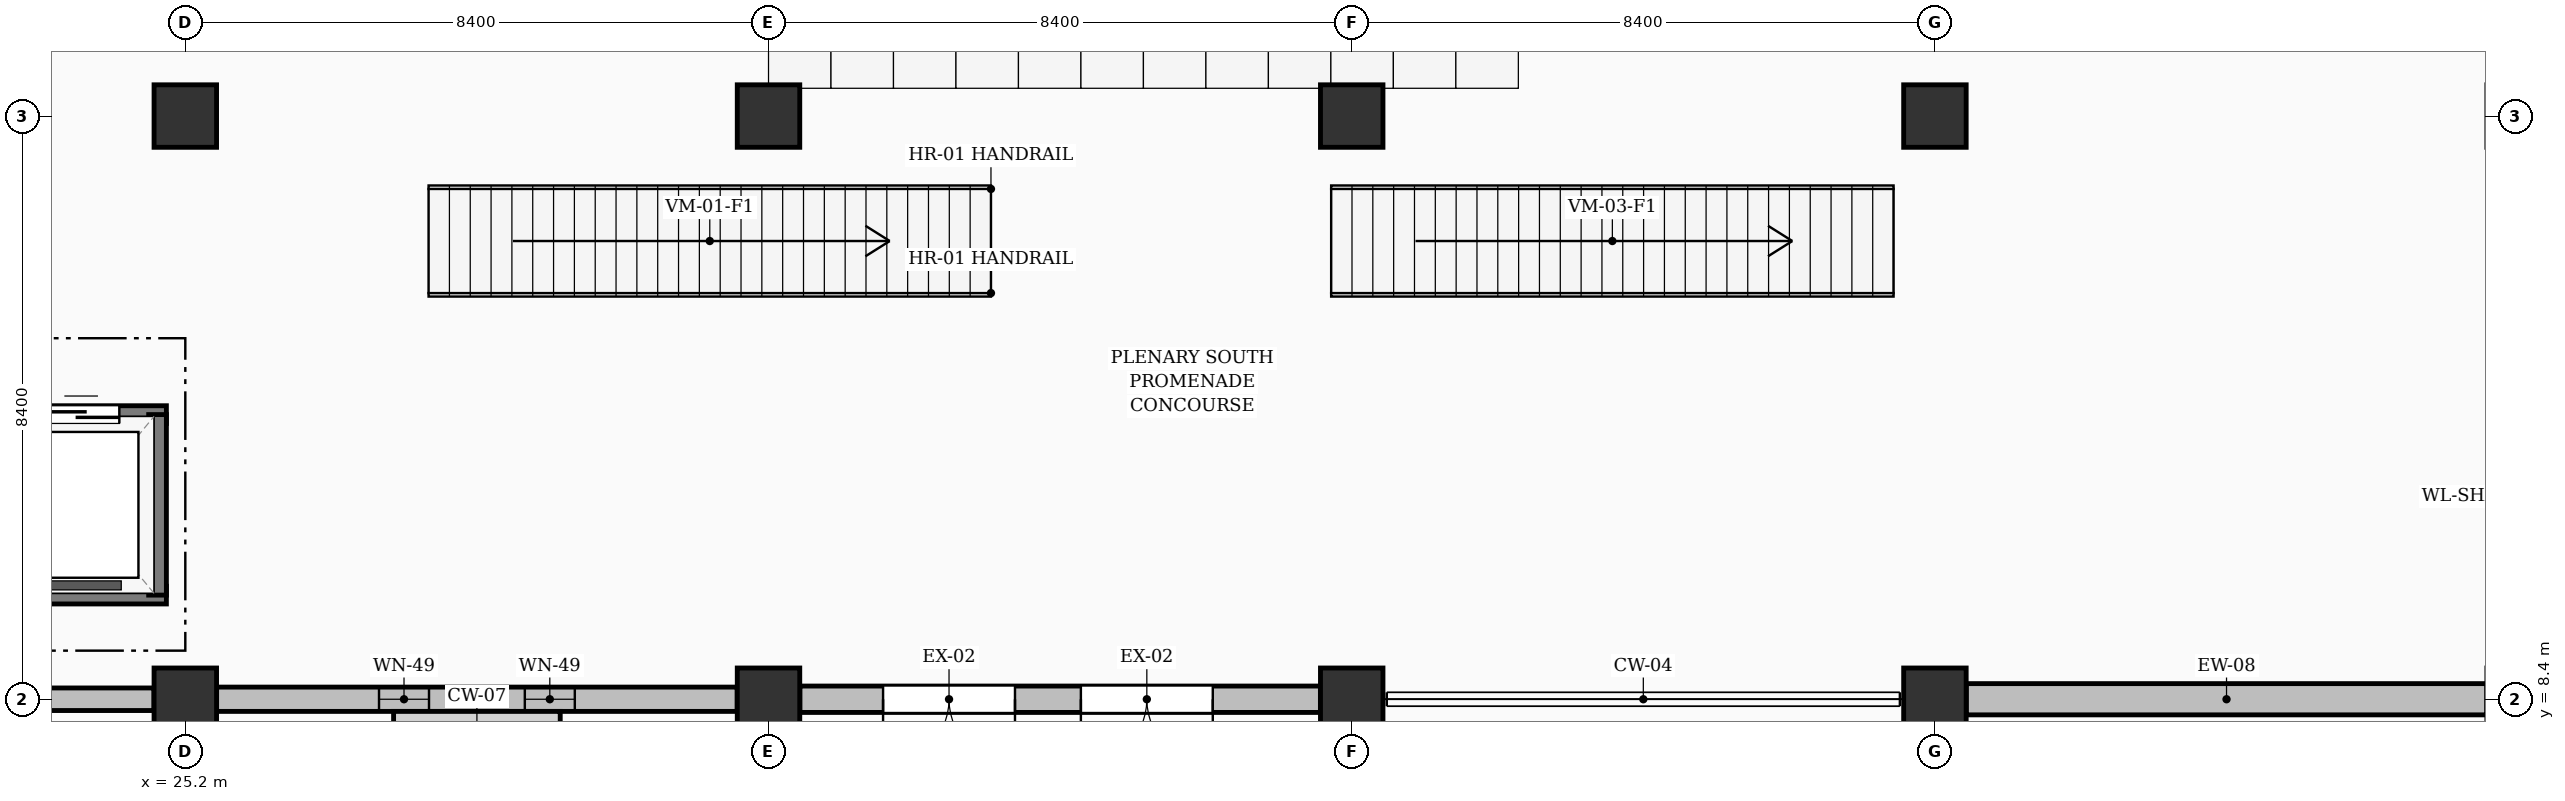
"""IFC4 building model, lengths in metres.
Left out: names, types, materials, properties, quantities, classifications, styles, units other than length and angle.
Written with IfcOpenShell. Run it as: python <this file> out.ifc"""

import sys

from ifc_helpers import new_model, si_unit, direction, frame, frame_2d, origin, origin_2d, place, context, subcontext, project, spatial, rectangle, extrude, element, fill, save


model = new_model("IFC4")
c1 = context("Model", 3, precision=1e-05, world=origin(), true_north=direction((0.0, 1.0)))
c2 = subcontext(c1, "Body", "Model", "MODEL_VIEW")
j1 = project(units=[si_unit("LENGTHUNIT", "METRE"), si_unit("PLANEANGLEUNIT", "RADIAN")], contexts=[c1])
p1 = place(None, origin())
s1 = spatial("IfcSite", under=j1, at=p1, CompositionType="ELEMENT")
p2 = place(p1, origin())
s2 = spatial("IfcBuilding", under=s1, at=p2, CompositionType="ELEMENT")
p3 = place(p2, origin())
s3 = spatial("IfcBuildingStorey", under=s2, at=p3, CompositionType="ELEMENT", Elevation=0.0)
for number, where, z_axis, x_axis in (
    (1, (25.2, 8.4, 0.0), (0.0, 0.0, 1.0), (1.0, 0.0, 0.0)),
    (2, (25.2, 16.8, 0.0), (0.0, 0.0, 1.0), (1.0, 0.0, 0.0)),
    (3, (33.6, 8.4, 0.0), (0.0, 0.0, 1.0), (1.0, 0.0, 0.0)),
    (4, (33.6, 16.8, 0.0), (0.0, 0.0, 1.0), (1.0, 0.0, 0.0)),
    (5, (42.0, 8.4, 0.0), (0.0, 0.0, 1.0), (1.0, 0.0, 0.0)),
    (6, (42.0, 16.8, 0.0), (0.0, 0.0, 1.0), (1.0, 0.0, 0.0)),
    (7, (50.4, 8.4, 0.0), (0.0, 0.0, 1.0), (1.0, 0.0, 0.0)),
    (8, (50.4, 16.8, 0.0), (0.0, 0.0, 1.0), (1.0, 0.0, 0.0)),
):
    element("IfcColumn", number, at=place(p3, frame(where, z_axis=z_axis, x_axis=x_axis)), inside=s3, PredefinedType="COLUMN", context=c2, shape_type="SweptSolid", body=[
        extrude(rectangle(XDim=0.9, YDim=0.9, at=origin_2d()), origin(), (0.0, 0.0, 1.0), 3.92),
    ])
p4 = place(p3, frame((17.251, 8.4, 0.0), z_axis=(0.0, 0.0, 1.0), x_axis=(1.0, 0.0, 0.0)))
e9 = element("IfcWall", 9, at=p4, inside=s3, PredefinedType="SOLIDWALL", context=c2, shape_type="SweptSolid", body=[
    extrude(rectangle(XDim=7.498, YDim=0.325, at=frame_2d((3.749, 0.0))), origin(), (0.0, 0.0, 1.0), 2.825),
])
p5 = place(p3, frame((25.651, 8.4, 0.0), z_axis=(0.0, 0.0, 1.0), x_axis=(1.0, 0.0, 0.0)))
e10 = element("IfcWall", 10, at=p5, inside=s3, PredefinedType="SOLIDWALL", context=c2, shape_type="SweptSolid", body=[
    extrude(rectangle(XDim=7.498, YDim=0.35, at=frame_2d((3.749, 0.0))), origin(), (0.0, 0.0, 1.0), 2.825),
])
p6 = place(p5, frame((2.339, 0.0, 0.3)))
e11 = element("IfcOpeningElement", 11, at=p6, cuts=e10, PredefinedType="OPENING", context=c2, shape_type="SweptSolid", body=[
    extrude(rectangle(XDim=0.72, YDim=1.95, at=frame_2d((0.36, 0.975))), frame((0.0, 0.185, 0.0), z_axis=(0.0, -1.0, 0.0), x_axis=(1.0, 0.0, 0.0)), (0.0, 0.0, 1.0), 0.37),
])
p7 = place(p5, frame((4.439, 0.0, 0.3)))
e12 = element("IfcOpeningElement", 12, at=p7, cuts=e10, PredefinedType="OPENING", context=c2, shape_type="SweptSolid", body=[
    extrude(rectangle(XDim=0.72, YDim=1.95, at=frame_2d((0.36, 0.975))), frame((0.0, 0.185, 0.0), z_axis=(0.0, -1.0, 0.0), x_axis=(1.0, 0.0, 0.0)), (0.0, 0.0, 1.0), 0.37),
])
p8 = place(p3, frame((34.051, 8.4, 0.0), z_axis=(0.0, 0.0, 1.0), x_axis=(1.0, 0.0, 0.0)))
e13 = element("IfcWall", 13, at=p8, inside=s3, PredefinedType="SOLIDWALL", context=c2, shape_type="SweptSolid", body=[
    extrude(rectangle(XDim=7.498, YDim=0.38, at=frame_2d((3.749, 0.0))), origin(), (0.0, 0.0, 1.0), 2.825),
])
p9 = place(p8, frame((1.199, 0.0, 0.0)))
e14 = element("IfcOpeningElement", 14, at=p9, cuts=e13, PredefinedType="OPENING", context=c2, shape_type="SweptSolid", body=[
    extrude(rectangle(XDim=1.9, YDim=2.2, at=frame_2d((0.95, 1.1))), frame((0.0, 0.2, 0.0), z_axis=(0.0, -1.0, 0.0), x_axis=(1.0, 0.0, 0.0)), (0.0, 0.0, 1.0), 0.4),
])
p10 = place(p8, frame((4.048, 0.0, 0.0)))
e15 = element("IfcOpeningElement", 15, at=p10, cuts=e13, PredefinedType="OPENING", context=c2, shape_type="SweptSolid", body=[
    extrude(rectangle(XDim=1.9, YDim=2.2, at=frame_2d((0.95, 1.1))), frame((0.0, 0.2, 0.0), z_axis=(0.0, -1.0, 0.0), x_axis=(1.0, 0.0, 0.0)), (0.0, 0.0, 1.0), 0.4),
])
p11 = place(p3, frame((50.851, 8.4, 0.0), z_axis=(0.0, 0.0, 1.0), x_axis=(1.0, 0.0, 0.0)))
e16 = element("IfcWall", 16, at=p11, inside=s3, PredefinedType="SOLIDWALL", context=c2, shape_type="SweptSolid", body=[
    extrude(rectangle(XDim=7.498, YDim=0.45, at=frame_2d((3.749, 0.0))), origin(), (0.0, 0.0, 1.0), 2.825),
])
p12 = place(p3, frame((22.472, 9.9, 0.0), z_axis=(0.0, 0.0, 1.0), x_axis=(1.0, 0.0, 0.0)))
e17 = element("IfcWall", 17, at=p12, inside=s3, PredefinedType="SOLIDWALL", context=c2, shape_type="SweptSolid", body=[
    extrude(rectangle(XDim=2.455, YDim=0.255, at=frame_2d((1.228, 0.0))), origin(), (0.0, 0.0, 1.0), 3.64),
])
p13 = place(p3, frame((22.472, 12.5, 0.0), z_axis=(0.0, 0.0, 1.0), x_axis=(1.0, 0.0, 0.0)))
e18 = element("IfcWall", 18, at=p13, inside=s3, PredefinedType="SOLIDWALL", context=c2, shape_type="SweptSolid", body=[
    extrude(rectangle(XDim=2.455, YDim=0.255, at=frame_2d((1.228, 0.0))), origin(), (0.0, 0.0, 1.0), 3.64),
])
p14 = place(p13, frame((0.677, 0.0, 0.0)))
e19 = element("IfcOpeningElement", 19, at=p14, cuts=e18, PredefinedType="OPENING", context=c2, shape_type="SweptSolid", body=[
    extrude(rectangle(XDim=1.1, YDim=2.15, at=frame_2d((0.55, 1.075))), frame((0.0, 0.137, 0.0), z_axis=(0.0, -1.0, 0.0), x_axis=(1.0, 0.0, 0.0)), (0.0, 0.0, 1.0), 0.275),
])
p15 = place(p3, frame((24.8, 9.9, 0.0), z_axis=(0.0, 0.0, 1.0), x_axis=(0.0, 1.0, 0.0)))
e20 = element("IfcWall", 20, at=p15, inside=s3, PredefinedType="SOLIDWALL", context=c2, shape_type="SweptSolid", body=[
    extrude(rectangle(XDim=2.6, YDim=0.255, at=frame_2d((1.3, 0.0))), origin(), (0.0, 0.0, 1.0), 3.64),
])
p16 = place(p6, origin())
e21 = element("IfcWindow", 21, at=p16, inside=s3, PartitioningType="SINGLE_PANEL", PredefinedType="WINDOW", context=c2, shape_type="SweptSolid", body=[
    extrude(rectangle(XDim=0.72, YDim=1.95, at=frame_2d((0.36, 0.975))), frame((0.0, 0.03, 0.0), z_axis=(0.0, -1.0, 0.0), x_axis=(1.0, 0.0, 0.0)), (0.0, 0.0, 1.0), 0.06),
])
fill(e11, e21)
p17 = place(p7, origin())
e22 = element("IfcWindow", 22, at=p17, inside=s3, PartitioningType="SINGLE_PANEL", PredefinedType="WINDOW", context=c2, shape_type="SweptSolid", body=[
    extrude(rectangle(XDim=0.72, YDim=1.95, at=frame_2d((0.36, 0.975))), frame((0.0, 0.03, 0.0), z_axis=(0.0, -1.0, 0.0), x_axis=(1.0, 0.0, 0.0)), (0.0, 0.0, 1.0), 0.06),
])
fill(e12, e22)
p18 = place(p9, frame((1.9, 0.0, 0.0), z_axis=(0.0, 0.0, 1.0), x_axis=(-1.0, 0.0, 0.0)))
e23 = element("IfcDoor", 23, at=p18, inside=s3, OperationType="DOUBLE_DOOR_SINGLE_SWING", PredefinedType="DOOR", context=c2, shape_type="SweptSolid", body=[
    extrude(rectangle(XDim=1.9, YDim=2.2, at=frame_2d((0.95, 1.1))), frame((0.0, 0.025, 0.0), z_axis=(0.0, -1.0, 0.0), x_axis=(1.0, 0.0, 0.0)), (0.0, 0.0, 1.0), 0.05),
])
fill(e14, e23)
p19 = place(p10, frame((1.9, 0.0, 0.0), z_axis=(0.0, 0.0, 1.0), x_axis=(-1.0, 0.0, 0.0)))
e24 = element("IfcDoor", 24, at=p19, inside=s3, OperationType="DOUBLE_DOOR_SINGLE_SWING", PredefinedType="DOOR", context=c2, shape_type="SweptSolid", body=[
    extrude(rectangle(XDim=1.9, YDim=2.2, at=frame_2d((0.95, 1.1))), frame((0.0, 0.025, 0.0), z_axis=(0.0, -1.0, 0.0), x_axis=(1.0, 0.0, 0.0)), (0.0, 0.0, 1.0), 0.05),
])
fill(e15, e24)
p20 = place(p14, origin())
e25 = element("IfcDoor", 25, at=p20, inside=s3, OperationType="DOUBLE_DOOR_SLIDING", PredefinedType="DOOR", context=c2, shape_type="SweptSolid", body=[
    extrude(rectangle(XDim=1.1, YDim=2.15, at=frame_2d((0.55, 1.075))), frame((0.0, 0.025, 0.0), z_axis=(0.0, -1.0, 0.0), x_axis=(1.0, 0.0, 0.0)), (0.0, 0.0, 1.0), 0.05),
])
fill(e19, e25)
save(model, sys.argv[1])
